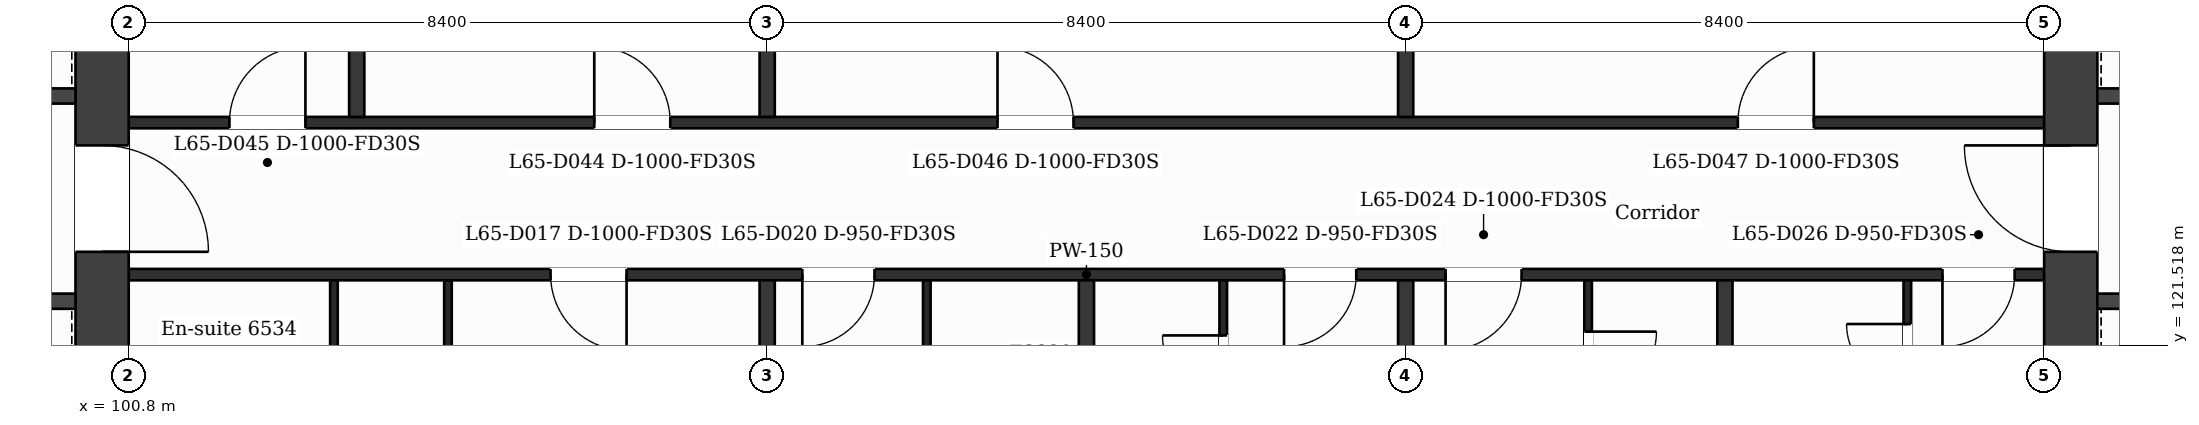
"""IFC4 building model, lengths in metres.
Left out: names, types, materials, properties, quantities, classifications, styles, units other than length and angle.
Written with IfcOpenShell. Run it as: python <this file> out.ifc"""

import sys

from ifc_helpers import new_model, si_unit, direction, frame, frame_2d, origin, place, context, subcontext, project, spatial, rectangle, extrude, element, fill, save


model = new_model("IFC4")
c1 = context("Model", 3, precision=1e-05, world=origin(), true_north=direction((0.0, 1.0)))
c2 = subcontext(c1, "Body", "Model", "MODEL_VIEW")
j1 = project(units=[si_unit("LENGTHUNIT", "METRE"), si_unit("PLANEANGLEUNIT", "RADIAN")], contexts=[c1])
p1 = place(None, origin())
s1 = spatial("IfcSite", under=j1, at=p1, CompositionType="ELEMENT")
p2 = place(p1, origin())
s2 = spatial("IfcBuilding", under=s1, at=p2, CompositionType="ELEMENT")
p3 = place(p2, frame((0.0, 0.0, 270.1)))
s3 = spatial("IfcBuildingStorey", under=s2, at=p3, CompositionType="ELEMENT", Elevation=270.1)
p4 = place(p3, frame((100.45, 132.05, 0.0), z_axis=(0.0, 0.0, 1.0), x_axis=(0.0, -1.0, 0.0)))
e1 = element("IfcWall", 1, at=p4, inside=s3, PredefinedType="SHEAR", context=c2, shape_type="SweptSolid", body=[
    extrude(rectangle(XDim=21.3, YDim=0.7, at=frame_2d((10.65, 0.0))), origin(), (0.0, 0.0, 1.0), 3.7),
])
p5 = place(p4, frame((7.9, 0.0, 0.0)))
e2 = element("IfcOpeningElement", 2, at=p5, cuts=e1, PredefinedType="OPENING", context=c2, shape_type="SweptSolid", body=[
    extrude(rectangle(XDim=1.4, YDim=2.1, at=frame_2d((0.7, 1.05))), frame((0.0, 0.36, 0.0), z_axis=(0.0, -1.0, 0.0), x_axis=(1.0, 0.0, 0.0)), (0.0, 0.0, 1.0), 0.72),
])
p6 = place(p3, frame((126.35, 110.75, 0.0), z_axis=(0.0, 0.0, 1.0), x_axis=(0.0, 1.0, 0.0)))
e3 = element("IfcWall", 3, at=p6, inside=s3, PredefinedType="SHEAR", context=c2, shape_type="SweptSolid", body=[
    extrude(rectangle(XDim=21.3, YDim=0.7, at=frame_2d((10.65, 0.0))), origin(), (0.0, 0.0, 1.0), 3.7),
])
p7 = place(p6, frame((12.0, 0.0, 0.0)))
e4 = element("IfcOpeningElement", 4, at=p7, cuts=e3, PredefinedType="OPENING", context=c2, shape_type="SweptSolid", body=[
    extrude(rectangle(XDim=1.4, YDim=2.1, at=frame_2d((0.7, 1.05))), frame((0.0, 0.36, 0.0), z_axis=(0.0, -1.0, 0.0), x_axis=(1.0, 0.0, 0.0)), (0.0, 0.0, 1.0), 0.72),
])
p8 = place(p3, frame((95.227, 122.1, 0.0), z_axis=(0.0, 0.0, 1.0), x_axis=(1.0, 0.0, 0.0)))
e5 = element("IfcWall", 5, at=p8, inside=s3, PredefinedType="PARTITIONING", context=c2, shape_type="SweptSolid", body=[
    extrude(rectangle(XDim=4.873, YDim=0.2, at=frame_2d((2.437, 0.0))), origin(), (0.0, 0.0, 1.0), 3.38),
])
p9 = place(p8, frame((0.605, 0.0, 0.0)))
e6 = element("IfcOpeningElement", 6, at=p9, cuts=e5, PredefinedType="OPENING", context=c2, shape_type="SweptSolid", body=[
    extrude(rectangle(XDim=1.1, YDim=2.1, at=frame_2d((0.55, 1.05))), frame((0.0, 0.11, 0.0), z_axis=(0.0, -1.0, 0.0), x_axis=(1.0, 0.0, 0.0)), (0.0, 0.0, 1.0), 0.22),
])
p10 = place(p8, frame((2.946, 0.0, 0.0)))
e7 = element("IfcOpeningElement", 7, at=p10, cuts=e5, PredefinedType="OPENING", context=c2, shape_type="SweptSolid", body=[
    extrude(rectangle(XDim=1.1, YDim=2.1, at=frame_2d((0.55, 1.05))), frame((0.0, 0.11, 0.0), z_axis=(0.0, -1.0, 0.0), x_axis=(1.0, 0.0, 0.0)), (0.0, 0.0, 1.0), 0.22),
])
p11 = place(p3, frame((126.7, 122.1, 0.0), z_axis=(0.0, 0.0, 1.0), x_axis=(1.0, 0.0, 0.0)))
e8 = element("IfcWall", 8, at=p11, inside=s3, PredefinedType="PARTITIONING", context=c2, shape_type="SweptSolid", body=[
    extrude(rectangle(XDim=4.873, YDim=0.2, at=frame_2d((2.437, 0.0))), origin(), (0.0, 0.0, 1.0), 3.38),
])
p12 = place(p11, frame((3.105, 0.0, 0.0)))
e9 = element("IfcOpeningElement", 9, at=p12, cuts=e8, PredefinedType="OPENING", context=c2, shape_type="SweptSolid", body=[
    extrude(rectangle(XDim=1.1, YDim=2.1, at=frame_2d((0.55, 1.05))), frame((0.0, 0.11, 0.0), z_axis=(0.0, -1.0, 0.0), x_axis=(1.0, 0.0, 0.0)), (0.0, 0.0, 1.0), 0.22),
])
p13 = place(p11, frame((0.668, 0.0, 0.0)))
e10 = element("IfcOpeningElement", 10, at=p13, cuts=e8, PredefinedType="OPENING", context=c2, shape_type="SweptSolid", body=[
    extrude(rectangle(XDim=1.1, YDim=2.1, at=frame_2d((0.55, 1.05))), frame((0.0, 0.11, 0.0), z_axis=(0.0, -1.0, 0.0), x_axis=(1.0, 0.0, 0.0)), (0.0, 0.0, 1.0), 0.22),
])
p14 = place(p3, frame((100.8, 122.45, 0.0), z_axis=(0.0, 0.0, 1.0), x_axis=(1.0, 0.0, 0.0)))
e11 = element("IfcWall", 11, at=p14, inside=s3, PredefinedType="PARTITIONING", context=c2, shape_type="SweptSolid", body=[
    extrude(rectangle(XDim=25.2, YDim=0.15, at=frame_2d((12.6, 0.0))), origin(), (0.0, 0.0, 1.0), 3.38),
])
p15 = place(p14, frame((5.55, 0.0, 0.0)))
e12 = element("IfcOpeningElement", 12, at=p15, cuts=e11, PredefinedType="OPENING", context=c2, shape_type="SweptSolid", body=[
    extrude(rectangle(XDim=1.0, YDim=2.1, at=frame_2d((0.5, 1.05))), frame((0.0, 0.085, 0.0), z_axis=(0.0, -1.0, 0.0), x_axis=(1.0, 0.0, 0.0)), (0.0, 0.0, 1.0), 0.17),
])
p16 = place(p14, frame((8.862, 0.0, 0.0)))
e13 = element("IfcOpeningElement", 13, at=p16, cuts=e11, PredefinedType="OPENING", context=c2, shape_type="SweptSolid", body=[
    extrude(rectangle(XDim=0.95, YDim=2.1, at=frame_2d((0.475, 1.05))), frame((0.0, 0.085, 0.0), z_axis=(0.0, -1.0, 0.0), x_axis=(1.0, 0.0, 0.0)), (0.0, 0.0, 1.0), 0.17),
])
p17 = place(p14, frame((15.2, 0.0, 0.0)))
e14 = element("IfcOpeningElement", 14, at=p17, cuts=e11, PredefinedType="OPENING", context=c2, shape_type="SweptSolid", body=[
    extrude(rectangle(XDim=0.95, YDim=2.1, at=frame_2d((0.475, 1.05))), frame((0.0, 0.085, 0.0), z_axis=(0.0, -1.0, 0.0), x_axis=(1.0, 0.0, 0.0)), (0.0, 0.0, 1.0), 0.17),
])
p18 = place(p14, frame((17.325, 0.0, 0.0)))
e15 = element("IfcOpeningElement", 15, at=p18, cuts=e11, PredefinedType="OPENING", context=c2, shape_type="SweptSolid", body=[
    extrude(rectangle(XDim=1.0, YDim=2.1, at=frame_2d((0.5, 1.05))), frame((0.0, 0.085, 0.0), z_axis=(0.0, -1.0, 0.0), x_axis=(1.0, 0.0, 0.0)), (0.0, 0.0, 1.0), 0.17),
])
p19 = place(p14, frame((23.862, 0.0, 0.0)))
e16 = element("IfcOpeningElement", 16, at=p19, cuts=e11, PredefinedType="OPENING", context=c2, shape_type="SweptSolid", body=[
    extrude(rectangle(XDim=0.95, YDim=2.1, at=frame_2d((0.475, 1.05))), frame((0.0, 0.085, 0.0), z_axis=(0.0, -1.0, 0.0), x_axis=(1.0, 0.0, 0.0)), (0.0, 0.0, 1.0), 0.17),
])
p20 = place(p3, frame((100.8, 124.45, 0.0), z_axis=(0.0, 0.0, 1.0), x_axis=(1.0, 0.0, 0.0)))
e17 = element("IfcWall", 17, at=p20, inside=s3, PredefinedType="PARTITIONING", context=c2, shape_type="SweptSolid", body=[
    extrude(rectangle(XDim=25.2, YDim=0.15, at=frame_2d((12.6, 0.0))), origin(), (0.0, 0.0, 1.0), 3.38),
])
p21 = place(p20, frame((6.125, 0.0, 0.0)))
e18 = element("IfcOpeningElement", 18, at=p21, cuts=e17, PredefinedType="OPENING", context=c2, shape_type="SweptSolid", body=[
    extrude(rectangle(XDim=1.0, YDim=2.1, at=frame_2d((0.5, 1.05))), frame((0.0, 0.085, 0.0), z_axis=(0.0, -1.0, 0.0), x_axis=(1.0, 0.0, 0.0)), (0.0, 0.0, 1.0), 0.17),
])
p22 = place(p20, frame((1.325, 0.0, 0.0)))
e19 = element("IfcOpeningElement", 19, at=p22, cuts=e17, PredefinedType="OPENING", context=c2, shape_type="SweptSolid", body=[
    extrude(rectangle(XDim=1.0, YDim=2.1, at=frame_2d((0.5, 1.05))), frame((0.0, 0.085, 0.0), z_axis=(0.0, -1.0, 0.0), x_axis=(1.0, 0.0, 0.0)), (0.0, 0.0, 1.0), 0.17),
])
p23 = place(p20, frame((11.43, 0.0, 0.0)))
e20 = element("IfcOpeningElement", 20, at=p23, cuts=e17, PredefinedType="OPENING", context=c2, shape_type="SweptSolid", body=[
    extrude(rectangle(XDim=1.0, YDim=2.1, at=frame_2d((0.5, 1.05))), frame((0.0, 0.085, 0.0), z_axis=(0.0, -1.0, 0.0), x_axis=(1.0, 0.0, 0.0)), (0.0, 0.0, 1.0), 0.17),
])
p24 = place(p20, frame((21.17, 0.0, 0.0)))
e21 = element("IfcOpeningElement", 21, at=p24, cuts=e17, PredefinedType="OPENING", context=c2, shape_type="SweptSolid", body=[
    extrude(rectangle(XDim=1.0, YDim=2.1, at=frame_2d((0.5, 1.05))), frame((0.0, 0.085, 0.0), z_axis=(0.0, -1.0, 0.0), x_axis=(1.0, 0.0, 0.0)), (0.0, 0.0, 1.0), 0.17),
])
p25 = place(p3, frame((92.702, 124.8, 0.0), z_axis=(0.0, 0.0, 1.0), x_axis=(1.0, 0.0, 0.0)))
e22 = element("IfcWall", 22, at=p25, inside=s3, PredefinedType="PARTITIONING", context=c2, shape_type="SweptSolid", body=[
    extrude(rectangle(XDim=7.398, YDim=0.2, at=frame_2d((3.699, 0.0))), origin(), (0.0, 0.0, 1.0), 3.38),
])
p26 = place(p25, frame((5.636, 0.0, 0.0)))
e23 = element("IfcOpeningElement", 23, at=p26, cuts=e22, PredefinedType="OPENING", context=c2, shape_type="SweptSolid", body=[
    extrude(rectangle(XDim=1.1, YDim=2.1, at=frame_2d((0.55, 1.05))), frame((0.0, 0.11, 0.0), z_axis=(0.0, -1.0, 0.0), x_axis=(1.0, 0.0, 0.0)), (0.0, 0.0, 1.0), 0.22),
])
p27 = place(p3, frame((126.7, 124.8, 0.0), z_axis=(0.0, 0.0, 1.0), x_axis=(1.0, 0.0, 0.0)))
e24 = element("IfcWall", 24, at=p27, inside=s3, PredefinedType="PARTITIONING", context=c2, shape_type="SweptSolid", body=[
    extrude(rectangle(XDim=4.849, YDim=0.2, at=frame_2d((2.424, 0.0))), origin(), (0.0, 0.0, 1.0), 3.38),
])
p28 = place(p27, frame((0.818, 0.0, 0.0)))
e25 = element("IfcOpeningElement", 25, at=p28, cuts=e24, PredefinedType="OPENING", context=c2, shape_type="SweptSolid", body=[
    extrude(rectangle(XDim=1.1, YDim=2.1, at=frame_2d((0.55, 1.05))), frame((0.0, 0.11, 0.0), z_axis=(0.0, -1.0, 0.0), x_axis=(1.0, 0.0, 0.0)), (0.0, 0.0, 1.0), 0.22),
])
p29 = place(p3, frame((103.5, 120.4, 0.0), z_axis=(0.0, 0.0, 1.0), x_axis=(0.0, 1.0, 0.0)))
e26 = element("IfcWall", 26, at=p29, inside=s3, PredefinedType="PARTITIONING", context=c2, shape_type="SweptSolid", body=[
    extrude(rectangle(XDim=1.975, YDim=0.1, at=frame_2d((0.988, 0.0))), origin(), (0.0, 0.0, 1.0), 3.38),
])
p30 = place(p3, frame((103.8, 124.525, 0.0), z_axis=(0.0, 0.0, 1.0), x_axis=(0.0, 1.0, 0.0)))
e27 = element("IfcWall", 27, at=p30, inside=s3, PredefinedType="PARTITIONING", context=c2, shape_type="SweptSolid", body=[
    extrude(rectangle(XDim=5.825, YDim=0.2, at=frame_2d((2.913, 0.0))), origin(), (0.0, 0.0, 1.0), 3.38),
])
p31 = place(p3, frame((105.0, 110.55, 0.0), z_axis=(0.0, 0.0, 1.0), x_axis=(0.0, 1.0, 0.0)))
e28 = element("IfcWall", 28, at=p31, inside=s3, PredefinedType="PARTITIONING", context=c2, shape_type="SweptSolid", body=[
    extrude(rectangle(XDim=11.825, YDim=0.1, at=frame_2d((5.913, 0.0))), origin(), (0.0, 0.0, 1.0), 3.38),
])
p32 = place(p31, frame((9.09, 0.0, 0.0)))
e29 = element("IfcOpeningElement", 29, at=p32, cuts=e28, PredefinedType="OPENING", context=c2, shape_type="SweptSolid", body=[
    extrude(rectangle(XDim=0.9, YDim=2.1, at=frame_2d((0.45, 1.05))), frame((0.0, 0.06, 0.0), z_axis=(0.0, -1.0, 0.0), x_axis=(1.0, 0.0, 0.0)), (0.0, 0.0, 1.0), 0.12),
])
p33 = place(p3, frame((109.2, 110.55, 0.0), z_axis=(0.0, 0.0, 1.0), x_axis=(0.0, 1.0, 0.0)))
e30 = element("IfcWall", 30, at=p33, inside=s3, PredefinedType="PARTITIONING", context=c2, shape_type="SweptSolid", body=[
    extrude(rectangle(XDim=11.825, YDim=0.2, at=frame_2d((5.913, 0.0))), origin(), (0.0, 0.0, 1.0), 3.38),
])
p34 = place(p3, frame((109.2, 124.525, 0.0), z_axis=(0.0, 0.0, 1.0), x_axis=(0.0, 1.0, 0.0)))
e31 = element("IfcWall", 31, at=p34, inside=s3, PredefinedType="PARTITIONING", context=c2, shape_type="SweptSolid", body=[
    extrude(rectangle(XDim=9.2, YDim=0.2, at=frame_2d((4.6, 0.0))), origin(), (0.0, 0.0, 1.0), 3.38),
])
p35 = place(p3, frame((111.3, 119.8, 0.0), z_axis=(0.0, 0.0, 1.0), x_axis=(0.0, 1.0, 0.0)))
e32 = element("IfcWall", 32, at=p35, inside=s3, PredefinedType="PARTITIONING", context=c2, shape_type="SweptSolid", body=[
    extrude(rectangle(XDim=2.575, YDim=0.1, at=frame_2d((1.288, 0.0))), origin(), (0.0, 0.0, 1.0), 3.38),
])
p36 = place(p35, frame((0.6, 0.0, 0.0)))
e33 = element("IfcOpeningElement", 33, at=p36, cuts=e32, PredefinedType="OPENING", context=c2, shape_type="SweptSolid", body=[
    extrude(rectangle(XDim=0.8, YDim=2.1, at=frame_2d((0.4, 1.05))), frame((0.0, 0.06, 0.0), z_axis=(0.0, -1.0, 0.0), x_axis=(1.0, 0.0, 0.0)), (0.0, 0.0, 1.0), 0.12),
])
p37 = place(p3, frame((113.4, 110.55, 0.0), z_axis=(0.0, 0.0, 1.0), x_axis=(0.0, 1.0, 0.0)))
e34 = element("IfcWall", 34, at=p37, inside=s3, PredefinedType="PARTITIONING", context=c2, shape_type="SweptSolid", body=[
    extrude(rectangle(XDim=11.825, YDim=0.2, at=frame_2d((5.913, 0.0))), origin(), (0.0, 0.0, 1.0), 3.38),
])
p38 = place(p3, frame((115.2, 120.1, 0.0), z_axis=(0.0, 0.0, 1.0), x_axis=(0.0, 1.0, 0.0)))
e35 = element("IfcWall", 35, at=p38, inside=s3, PredefinedType="PARTITIONING", context=c2, shape_type="SweptSolid", body=[
    extrude(rectangle(XDim=2.275, YDim=0.1, at=frame_2d((1.137, 0.0))), origin(), (0.0, 0.0, 1.0), 3.38),
])
p39 = place(p38, frame((0.75, 0.0, 0.0)))
e36 = element("IfcOpeningElement", 36, at=p39, cuts=e35, PredefinedType="OPENING", context=c2, shape_type="SweptSolid", body=[
    extrude(rectangle(XDim=0.8, YDim=2.1, at=frame_2d((0.4, 1.05))), frame((0.0, 0.06, 0.0), z_axis=(0.0, -1.0, 0.0), x_axis=(1.0, 0.0, 0.0)), (0.0, 0.0, 1.0), 0.12),
])
p40 = place(p3, frame((117.6, 110.55, 0.0), z_axis=(0.0, 0.0, 1.0), x_axis=(0.0, 1.0, 0.0)))
e37 = element("IfcWall", 37, at=p40, inside=s3, PredefinedType="PARTITIONING", context=c2, shape_type="SweptSolid", body=[
    extrude(rectangle(XDim=11.825, YDim=0.2, at=frame_2d((5.913, 0.0))), origin(), (0.0, 0.0, 1.0), 3.38),
])
p41 = place(p3, frame((117.6, 124.525, 0.0), z_axis=(0.0, 0.0, 1.0), x_axis=(0.0, 1.0, 0.0)))
e38 = element("IfcWall", 38, at=p41, inside=s3, PredefinedType="PARTITIONING", context=c2, shape_type="SweptSolid", body=[
    extrude(rectangle(XDim=9.2, YDim=0.2, at=frame_2d((4.6, 0.0))), origin(), (0.0, 0.0, 1.0), 3.38),
])
p42 = place(p3, frame((120.0, 120.1, 0.0), z_axis=(0.0, 0.0, 1.0), x_axis=(0.0, 1.0, 0.0)))
e39 = element("IfcWall", 39, at=p42, inside=s3, PredefinedType="PARTITIONING", context=c2, shape_type="SweptSolid", body=[
    extrude(rectangle(XDim=2.275, YDim=0.1, at=frame_2d((1.137, 0.0))), origin(), (0.0, 0.0, 1.0), 3.38),
])
p43 = place(p42, frame((0.7, 0.0, 0.0)))
e40 = element("IfcOpeningElement", 40, at=p43, cuts=e39, PredefinedType="OPENING", context=c2, shape_type="SweptSolid", body=[
    extrude(rectangle(XDim=0.9, YDim=2.1, at=frame_2d((0.45, 1.05))), frame((0.0, 0.06, 0.0), z_axis=(0.0, -1.0, 0.0), x_axis=(1.0, 0.0, 0.0)), (0.0, 0.0, 1.0), 0.12),
])
p44 = place(p3, frame((121.8, 110.55, 0.0), z_axis=(0.0, 0.0, 1.0), x_axis=(0.0, 1.0, 0.0)))
e41 = element("IfcWall", 41, at=p44, inside=s3, PredefinedType="PARTITIONING", context=c2, shape_type="SweptSolid", body=[
    extrude(rectangle(XDim=11.825, YDim=0.2, at=frame_2d((5.913, 0.0))), origin(), (0.0, 0.0, 1.0), 3.38),
])
p45 = place(p3, frame((124.2, 119.8, 0.0), z_axis=(0.0, 0.0, 1.0), x_axis=(0.0, 1.0, 0.0)))
e42 = element("IfcWall", 42, at=p45, inside=s3, PredefinedType="PARTITIONING", context=c2, shape_type="SweptSolid", body=[
    extrude(rectangle(XDim=2.575, YDim=0.1, at=frame_2d((1.288, 0.0))), origin(), (0.0, 0.0, 1.0), 3.38),
])
p46 = place(p45, frame((1.2, 0.0, 0.0)))
e43 = element("IfcOpeningElement", 43, at=p46, cuts=e42, PredefinedType="OPENING", context=c2, shape_type="SweptSolid", body=[
    extrude(rectangle(XDim=0.8, YDim=2.1, at=frame_2d((0.4, 1.05))), frame((0.0, 0.06, 0.0), z_axis=(0.0, -1.0, 0.0), x_axis=(1.0, 0.0, 0.0)), (0.0, 0.0, 1.0), 0.12),
])
p47 = place(p15, origin())
e44 = element("IfcDoor", 44, at=p47, inside=s3, OperationType="SINGLE_SWING_RIGHT", PredefinedType="DOOR", context=c2, shape_type="SweptSolid", body=[
    extrude(rectangle(XDim=1.0, YDim=2.1, at=frame_2d((0.5, 1.05))), frame((0.0, 0.025, 0.0), z_axis=(0.0, -1.0, 0.0), x_axis=(1.0, 0.0, 0.0)), (0.0, 0.0, 1.0), 0.05),
])
fill(e12, e44)
p48 = place(p16, origin())
e45 = element("IfcDoor", 45, at=p48, inside=s3, OperationType="SINGLE_SWING_LEFT", PredefinedType="DOOR", context=c2, shape_type="SweptSolid", body=[
    extrude(rectangle(XDim=0.95, YDim=2.1, at=frame_2d((0.475, 1.05))), frame((0.0, 0.025, 0.0), z_axis=(0.0, -1.0, 0.0), x_axis=(1.0, 0.0, 0.0)), (0.0, 0.0, 1.0), 0.05),
])
fill(e13, e45)
p49 = place(p17, origin())
e46 = element("IfcDoor", 46, at=p49, inside=s3, OperationType="SINGLE_SWING_LEFT", PredefinedType="DOOR", context=c2, shape_type="SweptSolid", body=[
    extrude(rectangle(XDim=0.95, YDim=2.1, at=frame_2d((0.475, 1.05))), frame((0.0, 0.025, 0.0), z_axis=(0.0, -1.0, 0.0), x_axis=(1.0, 0.0, 0.0)), (0.0, 0.0, 1.0), 0.05),
])
fill(e14, e46)
p50 = place(p39, origin())
e47 = element("IfcDoor", 47, at=p50, inside=s3, OperationType="SINGLE_SWING_RIGHT", PredefinedType="DOOR", context=c2, shape_type="SweptSolid", body=[
    extrude(rectangle(XDim=0.8, YDim=2.1, at=frame_2d((0.4, 1.05))), frame((0.0, 0.025, 0.0), z_axis=(0.0, -1.0, 0.0), x_axis=(1.0, 0.0, 0.0)), (0.0, 0.0, 1.0), 0.05),
])
fill(e36, e47)
p51 = place(p18, origin())
e48 = element("IfcDoor", 48, at=p51, inside=s3, OperationType="SINGLE_SWING_LEFT", PredefinedType="DOOR", context=c2, shape_type="SweptSolid", body=[
    extrude(rectangle(XDim=1.0, YDim=2.1, at=frame_2d((0.5, 1.05))), frame((0.0, 0.025, 0.0), z_axis=(0.0, -1.0, 0.0), x_axis=(1.0, 0.0, 0.0)), (0.0, 0.0, 1.0), 0.05),
])
fill(e15, e48)
p52 = place(p43, origin())
e49 = element("IfcDoor", 49, at=p52, inside=s3, OperationType="SINGLE_SWING_RIGHT", PredefinedType="DOOR", context=c2, shape_type="SweptSolid", body=[
    extrude(rectangle(XDim=0.9, YDim=2.1, at=frame_2d((0.45, 1.05))), frame((0.0, 0.025, 0.0), z_axis=(0.0, -1.0, 0.0), x_axis=(1.0, 0.0, 0.0)), (0.0, 0.0, 1.0), 0.05),
])
fill(e40, e49)
p53 = place(p19, origin())
e50 = element("IfcDoor", 50, at=p53, inside=s3, OperationType="SINGLE_SWING_LEFT", PredefinedType="DOOR", context=c2, shape_type="SweptSolid", body=[
    extrude(rectangle(XDim=0.95, YDim=2.1, at=frame_2d((0.475, 1.05))), frame((0.0, 0.025, 0.0), z_axis=(0.0, -1.0, 0.0), x_axis=(1.0, 0.0, 0.0)), (0.0, 0.0, 1.0), 0.05),
])
fill(e16, e50)
p54 = place(p46, origin())
e51 = element("IfcDoor", 51, at=p54, inside=s3, OperationType="SINGLE_SWING_RIGHT", PredefinedType="DOOR", context=c2, shape_type="SweptSolid", body=[
    extrude(rectangle(XDim=0.8, YDim=2.1, at=frame_2d((0.4, 1.05))), frame((0.0, 0.025, 0.0), z_axis=(0.0, -1.0, 0.0), x_axis=(1.0, 0.0, 0.0)), (0.0, 0.0, 1.0), 0.05),
])
fill(e43, e51)
p55 = place(p21, origin())
e52 = element("IfcDoor", 52, at=p55, inside=s3, OperationType="SINGLE_SWING_LEFT", PredefinedType="DOOR", context=c2, shape_type="SweptSolid", body=[
    extrude(rectangle(XDim=1.0, YDim=2.1, at=frame_2d((0.5, 1.05))), frame((0.0, 0.025, 0.0), z_axis=(0.0, -1.0, 0.0), x_axis=(1.0, 0.0, 0.0)), (0.0, 0.0, 1.0), 0.05),
])
fill(e18, e52)
p56 = place(p22, origin())
e53 = element("IfcDoor", 53, at=p56, inside=s3, OperationType="SINGLE_SWING_RIGHT", PredefinedType="DOOR", context=c2, shape_type="SweptSolid", body=[
    extrude(rectangle(XDim=1.0, YDim=2.1, at=frame_2d((0.5, 1.05))), frame((0.0, 0.025, 0.0), z_axis=(0.0, -1.0, 0.0), x_axis=(1.0, 0.0, 0.0)), (0.0, 0.0, 1.0), 0.05),
])
fill(e19, e53)
p57 = place(p23, origin())
e54 = element("IfcDoor", 54, at=p57, inside=s3, OperationType="SINGLE_SWING_LEFT", PredefinedType="DOOR", context=c2, shape_type="SweptSolid", body=[
    extrude(rectangle(XDim=1.0, YDim=2.1, at=frame_2d((0.5, 1.05))), frame((0.0, 0.025, 0.0), z_axis=(0.0, -1.0, 0.0), x_axis=(1.0, 0.0, 0.0)), (0.0, 0.0, 1.0), 0.05),
])
fill(e20, e54)
p58 = place(p24, origin())
e55 = element("IfcDoor", 55, at=p58, inside=s3, OperationType="SINGLE_SWING_RIGHT", PredefinedType="DOOR", context=c2, shape_type="SweptSolid", body=[
    extrude(rectangle(XDim=1.0, YDim=2.1, at=frame_2d((0.5, 1.05))), frame((0.0, 0.025, 0.0), z_axis=(0.0, -1.0, 0.0), x_axis=(1.0, 0.0, 0.0)), (0.0, 0.0, 1.0), 0.05),
])
fill(e21, e55)
p59 = place(p5, origin())
e56 = element("IfcDoor", 56, at=p59, inside=s3, OperationType="SINGLE_SWING_RIGHT", PredefinedType="DOOR", context=c2, shape_type="SweptSolid", body=[
    extrude(rectangle(XDim=1.4, YDim=2.1, at=frame_2d((0.7, 1.05))), frame((0.0, 0.025, 0.0), z_axis=(0.0, -1.0, 0.0), x_axis=(1.0, 0.0, 0.0)), (0.0, 0.0, 1.0), 0.05),
])
fill(e2, e56)
p60 = place(p7, origin())
e57 = element("IfcDoor", 57, at=p60, inside=s3, OperationType="SINGLE_SWING_RIGHT", PredefinedType="DOOR", context=c2, shape_type="SweptSolid", body=[
    extrude(rectangle(XDim=1.4, YDim=2.1, at=frame_2d((0.7, 1.05))), frame((0.0, 0.025, 0.0), z_axis=(0.0, -1.0, 0.0), x_axis=(1.0, 0.0, 0.0)), (0.0, 0.0, 1.0), 0.05),
])
fill(e4, e57)
save(model, sys.argv[1])
